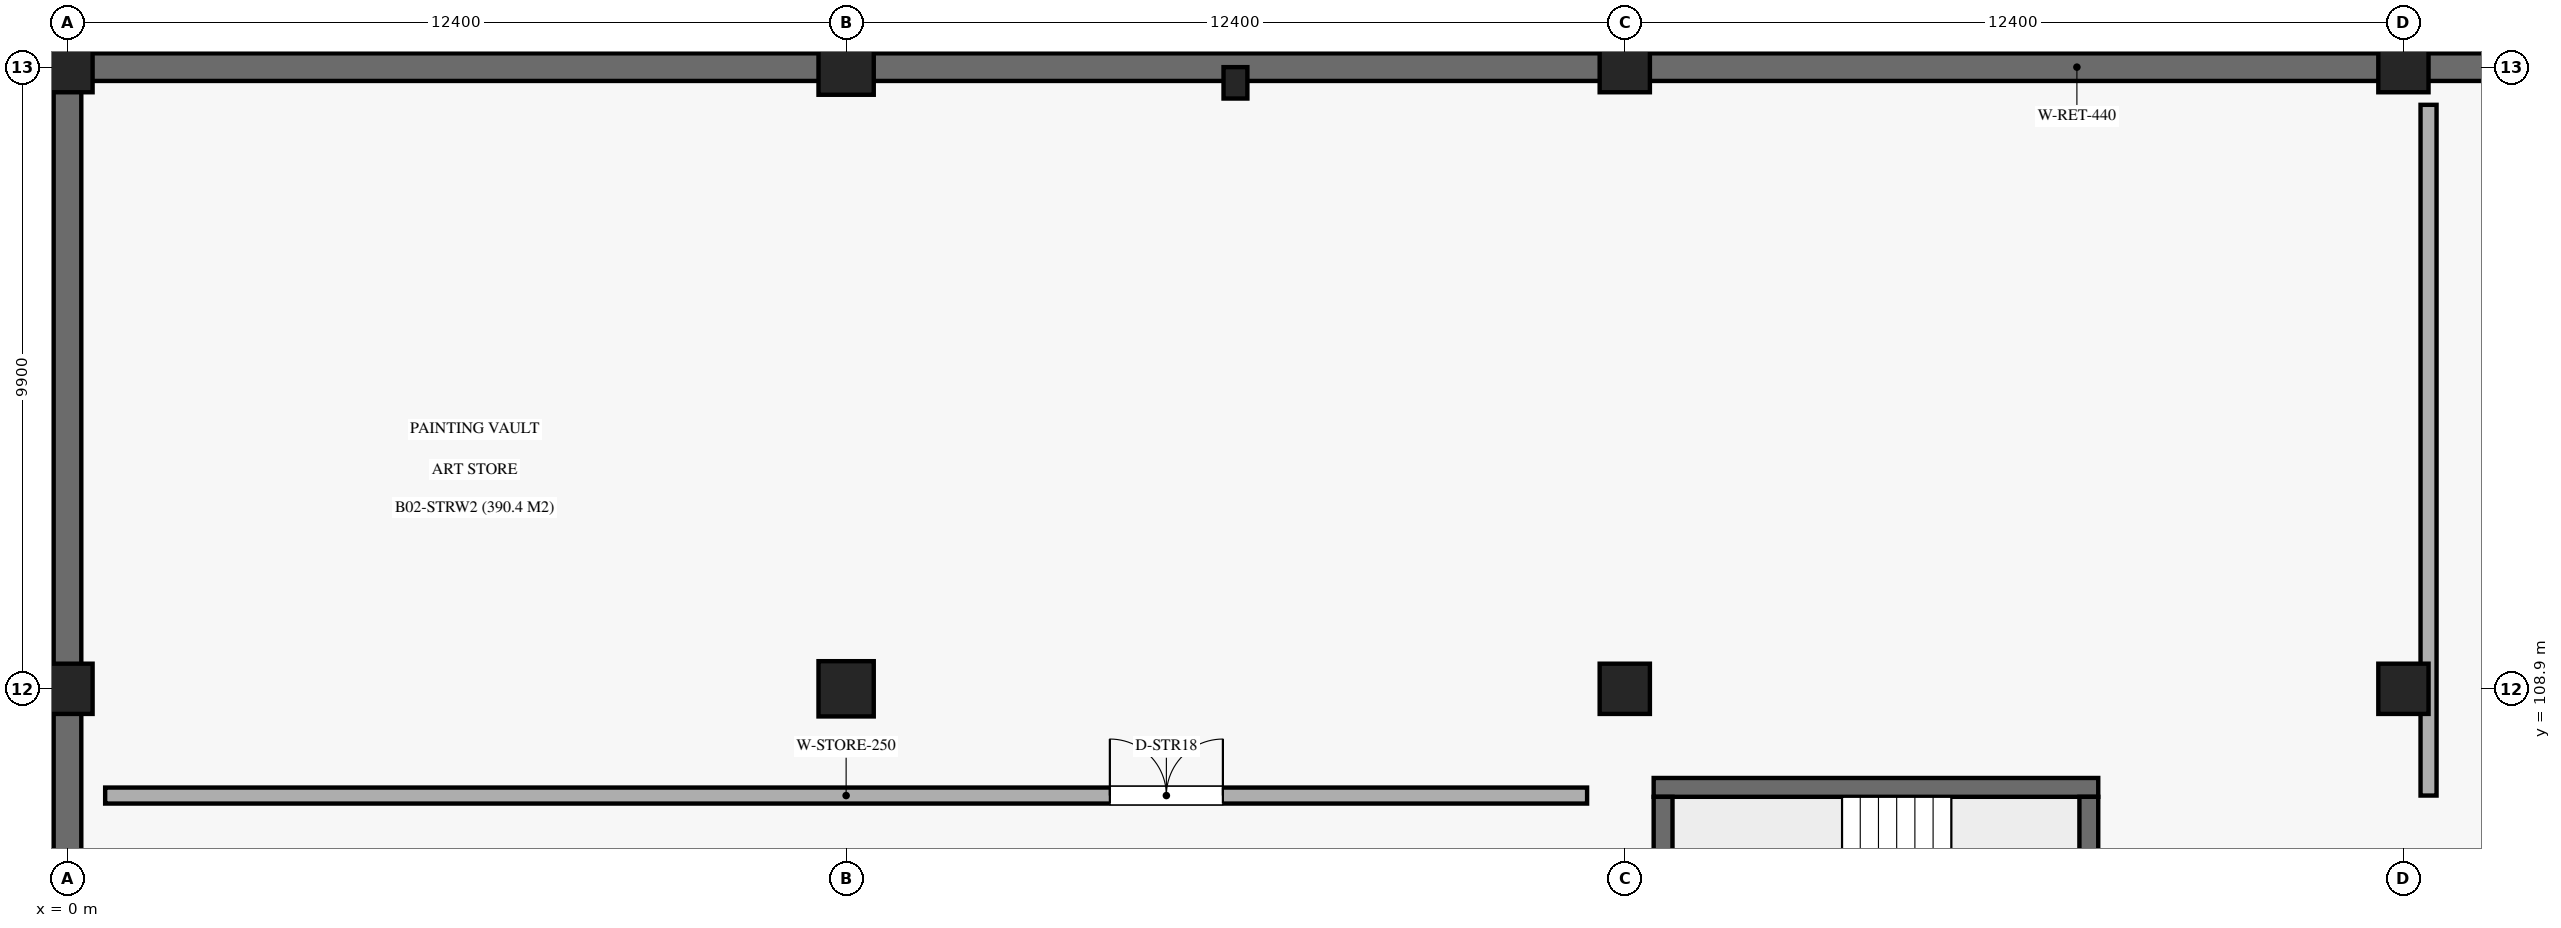
"""IFC4 building model, lengths in metres.
Left out: names, types, materials, properties, quantities, classifications, styles, units other than length and angle.
Written with IfcOpenShell. Run it as: python <this file> out.ifc"""

import sys

from ifc_helpers import new_model, si_unit, direction, frame, frame_2d, origin, origin_2d, place, context, subcontext, project, spatial, rectangle, circle, extrude, element, fill, save


model = new_model("IFC4")
c1 = context("Model", 3, precision=1e-05, world=origin(), true_north=direction((0.0, 1.0)))
c2 = subcontext(c1, "Body", "Model", "MODEL_VIEW")
j1 = project(units=[si_unit("LENGTHUNIT", "METRE"), si_unit("PLANEANGLEUNIT", "RADIAN")], contexts=[c1])
p1 = place(None, origin())
s1 = spatial("IfcSite", under=j1, at=p1, CompositionType="ELEMENT")
p2 = place(p1, origin())
s2 = spatial("IfcBuilding", under=s1, at=p2, CompositionType="ELEMENT")
p3 = place(p2, frame((0.0, 0.0, -9.18)))
s3 = spatial("IfcBuildingStorey", under=s2, at=p3, CompositionType="ELEMENT", Elevation=-9.18)
for number, where, z_axis, x_axis in (
    (1, (0.0, 108.9, 0.0), (0.0, 0.0, 1.0), (1.0, 0.0, 0.0)),
    (2, (0.0, 118.8, 0.0), (0.0, 0.0, 1.0), (1.0, 0.0, 0.0)),
):
    element("IfcColumn", number, at=place(p3, frame(where, z_axis=z_axis, x_axis=x_axis)), inside=s3, PredefinedType="COLUMN", context=c2, shape_type="SweptSolid", body=[
        extrude(rectangle(XDim=0.8, YDim=0.8, at=origin_2d()), origin(), (0.0, 0.0, 1.0), 4.59),
    ])
for number, where, z_axis, x_axis in (
    (3, (12.4, 108.9, 0.0), (0.0, 0.0, 1.0), (1.0, 0.0, 0.0)),
    (4, (12.4, 118.8, 0.0), (0.0, 0.0, 1.0), (1.0, 0.0, 0.0)),
):
    element("IfcColumn", number, at=place(p3, frame(where, z_axis=z_axis, x_axis=x_axis)), inside=s3, PredefinedType="COLUMN", context=c2, shape_type="SweptSolid", body=[
        extrude(circle(Radius=0.44, at=origin_2d()), origin(), (0.0, 0.0, 1.0), 4.59),
    ])
for number, where, z_axis, x_axis in (
    (5, (24.8, 108.9, 0.0), (0.0, 0.0, 1.0), (1.0, 0.0, 0.0)),
    (6, (24.8, 118.8, 0.0), (0.0, 0.0, 1.0), (1.0, 0.0, 0.0)),
    (7, (37.2, 108.9, 0.0), (0.0, 0.0, 1.0), (1.0, 0.0, 0.0)),
    (8, (37.2, 118.8, 0.0), (0.0, 0.0, 1.0), (1.0, 0.0, 0.0)),
):
    element("IfcColumn", number, at=place(p3, frame(where, z_axis=z_axis, x_axis=x_axis)), inside=s3, PredefinedType="COLUMN", context=c2, shape_type="SweptSolid", body=[
        extrude(rectangle(XDim=0.8, YDim=0.8, at=origin_2d()), origin(), (0.0, 0.0, 1.0), 4.59),
    ])
p4 = place(p3, frame((18.6, 118.55, 0.0), z_axis=(0.0, 0.0, 1.0), x_axis=(1.0, 0.0, 0.0)))
e9 = element("IfcColumn", 9, at=p4, inside=s3, PredefinedType="PILASTER", context=c2, shape_type="SweptSolid", body=[
    extrude(rectangle(XDim=0.38, YDim=0.5, at=origin_2d()), origin(), (0.0, 0.0, 1.0), 4.59),
])
p5 = place(p3, frame((114.4, 118.8, 0.0), z_axis=(0.0, 0.0, 1.0), x_axis=(-1.0, 0.0, 0.0)))
e10 = element("IfcWall", 10, at=p5, inside=s3, PredefinedType="USERDEFINED", context=c2, shape_type="SweptSolid", body=[
    extrude(rectangle(XDim=114.4, YDim=0.44, at=frame_2d((57.2, 0.0))), origin(), (0.0, 0.0, 1.0), 3.66),
])
p6 = place(p3, frame((0.0, 118.8, 0.0), z_axis=(0.0, 0.0, 1.0), x_axis=(0.0, -1.0, 0.0)))
e11 = element("IfcWall", 11, at=p6, inside=s3, PredefinedType="USERDEFINED", context=c2, shape_type="SweptSolid", body=[
    extrude(rectangle(XDim=39.6, YDim=0.44, at=frame_2d((19.8, 0.0))), origin(), (0.0, 0.0, 1.0), 3.66),
])
p7 = place(p3, frame((25.26, 107.33, 0.0), z_axis=(0.0, 0.0, 1.0), x_axis=(1.0, 0.0, 0.0)))
e12 = element("IfcWall", 12, at=p7, inside=s3, PredefinedType="SHEAR", context=c2, shape_type="SweptSolid", body=[
    extrude(rectangle(XDim=7.08, YDim=0.3, at=frame_2d((3.54, 0.0))), origin(), (0.0, 0.0, 1.0), 4.31),
])
for number, where, z_axis, x_axis in (
    (13, (25.41, 100.7, 0.0), (0.0, 0.0, 1.0), (0.0, 1.0, 0.0)),
    (14, (32.19, 100.7, 0.0), (0.0, 0.0, 1.0), (0.0, 1.0, 0.0)),
):
    element("IfcWall", number, at=place(p3, frame(where, z_axis=z_axis, x_axis=x_axis)), inside=s3, PredefinedType="SHEAR", context=c2, shape_type="SweptSolid", body=[
        extrude(rectangle(XDim=6.48, YDim=0.3, at=frame_2d((3.24, 0.0))), origin(), (0.0, 0.0, 1.0), 4.31),
    ])
p8 = place(p3, frame((0.6, 107.2, 0.0), z_axis=(0.0, 0.0, 1.0), x_axis=(1.0, 0.0, 0.0)))
e15 = element("IfcWall", 15, at=p8, inside=s3, PredefinedType="SOLIDWALL", context=c2, shape_type="SweptSolid", body=[
    extrude(rectangle(XDim=23.6, YDim=0.255, at=frame_2d((11.8, 0.0))), origin(), (0.0, 0.0, 1.0), 3.43),
])
p9 = place(p8, frame((16.0, 0.0, 0.0)))
e16 = element("IfcOpeningElement", 16, at=p9, cuts=e15, PredefinedType="OPENING", context=c2, shape_type="SweptSolid", body=[
    extrude(rectangle(XDim=1.8, YDim=2.35, at=frame_2d((0.9, 1.175))), frame((0.0, 0.137, 0.0), z_axis=(0.0, -1.0, 0.0), x_axis=(1.0, 0.0, 0.0)), (0.0, 0.0, 1.0), 0.275),
])
p10 = place(p3, frame((37.6, 107.2, 0.0), z_axis=(0.0, 0.0, 1.0), x_axis=(0.0, 1.0, 0.0)))
e17 = element("IfcWall", 17, at=p10, inside=s3, PredefinedType="SOLIDWALL", context=c2, shape_type="SweptSolid", body=[
    extrude(rectangle(XDim=11.0, YDim=0.255, at=frame_2d((5.5, 0.0))), origin(), (0.0, 0.0, 1.0), 3.43),
])
p11 = place(p9, origin())
e18 = element("IfcDoor", 18, at=p11, inside=s3, OperationType="DOUBLE_DOOR_SINGLE_SWING", PredefinedType="DOOR", context=c2, shape_type="SweptSolid", body=[
    extrude(rectangle(XDim=1.8, YDim=2.35, at=frame_2d((0.9, 1.175))), frame((0.0, 0.025, 0.0), z_axis=(0.0, -1.0, 0.0), x_axis=(1.0, 0.0, 0.0)), (0.0, 0.0, 1.0), 0.05),
])
fill(e16, e18)
save(model, sys.argv[1])
